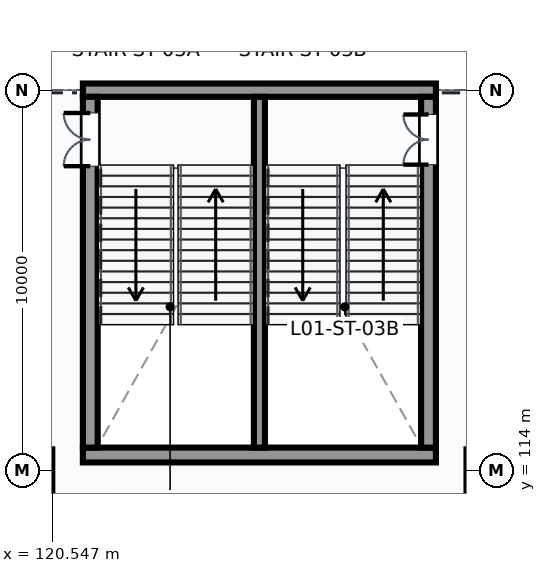
"""IFC4 building model, lengths in metres.
Left out: names, types, materials, properties, quantities, classifications, styles, units other than length and angle.
Written with IfcOpenShell. Run it as: python <this file> out.ifc"""

import sys

from ifc_helpers import new_model, si_unit, direction, frame, frame_2d, origin, place, context, subcontext, project, spatial, rectangle, extrude, element, fill, save


model = new_model("IFC4")
c1 = context("Model", 3, precision=1e-05, world=origin(), true_north=direction((0.0, 1.0)))
c2 = subcontext(c1, "Body", "Model", "MODEL_VIEW")
j1 = project(units=[si_unit("LENGTHUNIT", "METRE"), si_unit("PLANEANGLEUNIT", "RADIAN")], contexts=[c1])
p1 = place(None, origin())
s1 = spatial("IfcSite", under=j1, at=p1, CompositionType="ELEMENT")
p2 = place(p1, origin())
s2 = spatial("IfcBuilding", under=s1, at=p2, CompositionType="ELEMENT")
p3 = place(p2, frame((0.0, 0.0, 5.4)))
s3 = spatial("IfcBuildingStorey", under=s2, at=p3, CompositionType="ELEMENT", Elevation=5.4)
p4 = place(p3, frame((121.355, 114.4, 0.0), z_axis=(0.0, 0.0, 1.0), x_axis=(1.0, 0.0, 0.0)))
e1 = element("IfcWall", 1, at=p4, inside=s3, PredefinedType="SHEAR", context=c2, shape_type="SweptSolid", body=[
    extrude(rectangle(XDim=9.29, YDim=0.39, at=frame_2d((4.645, 0.0))), origin(), (0.0, 0.0, 1.0), 4.8),
])
p5 = place(p3, frame((121.355, 124.0, 0.0), z_axis=(0.0, 0.0, 1.0), x_axis=(1.0, 0.0, 0.0)))
e2 = element("IfcWall", 2, at=p5, inside=s3, PredefinedType="SHEAR", context=c2, shape_type="SweptSolid", body=[
    extrude(rectangle(XDim=9.29, YDim=0.35, at=frame_2d((4.645, 0.0))), origin(), (0.0, 0.0, 1.0), 3.906),
])
p6 = place(p3, frame((121.55, 114.595, 0.0), z_axis=(0.0, 0.0, 1.0), x_axis=(0.0, 1.0, 0.0)))
e3 = element("IfcWall", 3, at=p6, inside=s3, PredefinedType="SHEAR", context=c2, shape_type="SweptSolid", body=[
    extrude(rectangle(XDim=9.23, YDim=0.39, at=frame_2d((4.615, 0.0))), origin(), (0.0, 0.0, 1.0), 4.8),
])
p7 = place(p6, frame((7.405, 0.0, 0.0)))
e4 = element("IfcOpeningElement", 4, at=p7, cuts=e3, PredefinedType="OPENING", context=c2, shape_type="SweptSolid", body=[
    extrude(rectangle(XDim=1.4, YDim=2.2, at=frame_2d((0.7, 1.1))), frame((0.0, 0.205, 0.0), z_axis=(0.0, -1.0, 0.0), x_axis=(1.0, 0.0, 0.0)), (0.0, 0.0, 1.0), 0.41),
])
p8 = place(p3, frame((130.45, 114.595, 0.0), z_axis=(0.0, 0.0, 1.0), x_axis=(0.0, 1.0, 0.0)))
e5 = element("IfcWall", 5, at=p8, inside=s3, PredefinedType="SHEAR", context=c2, shape_type="SweptSolid", body=[
    extrude(rectangle(XDim=9.23, YDim=0.39, at=frame_2d((4.615, 0.0))), origin(), (0.0, 0.0, 1.0), 4.8),
])
p9 = place(p8, frame((7.445, 0.0, 0.0)))
e6 = element("IfcOpeningElement", 6, at=p9, cuts=e5, PredefinedType="OPENING", context=c2, shape_type="SweptSolid", body=[
    extrude(rectangle(XDim=1.32, YDim=2.2, at=frame_2d((0.66, 1.1))), frame((0.0, 0.205, 0.0), z_axis=(0.0, -1.0, 0.0), x_axis=(1.0, 0.0, 0.0)), (0.0, 0.0, 1.0), 0.41),
])
p10 = place(p3, frame((126.0, 114.595, 0.0), z_axis=(0.0, 0.0, 1.0), x_axis=(0.0, 1.0, 0.0)))
e7 = element("IfcWall", 7, at=p10, inside=s3, PredefinedType="SHEAR", context=c2, shape_type="SweptSolid", body=[
    extrude(rectangle(XDim=9.23, YDim=0.29, at=frame_2d((4.615, 0.0))), origin(), (0.0, 0.0, 1.0), 4.8),
])
p11 = place(p7, frame((1.4, 0.0, 0.0), z_axis=(0.0, 0.0, 1.0), x_axis=(-1.0, 0.0, 0.0)))
e8 = element("IfcDoor", 8, at=p11, inside=s3, OperationType="DOUBLE_DOOR_SINGLE_SWING", PredefinedType="DOOR", context=c2, shape_type="SweptSolid", body=[
    extrude(rectangle(XDim=1.4, YDim=2.2, at=frame_2d((0.7, 1.1))), frame((0.0, 0.025, 0.0), z_axis=(0.0, -1.0, 0.0), x_axis=(1.0, 0.0, 0.0)), (0.0, 0.0, 1.0), 0.05),
])
fill(e4, e8)
p12 = place(p9, origin())
e9 = element("IfcDoor", 9, at=p12, inside=s3, OperationType="DOUBLE_DOOR_SINGLE_SWING", PredefinedType="DOOR", context=c2, shape_type="SweptSolid", body=[
    extrude(rectangle(XDim=1.32, YDim=2.2, at=frame_2d((0.66, 1.1))), frame((0.0, 0.025, 0.0), z_axis=(0.0, -1.0, 0.0), x_axis=(1.0, 0.0, 0.0)), (0.0, 0.0, 1.0), 0.05),
])
fill(e6, e9)
save(model, sys.argv[1])
